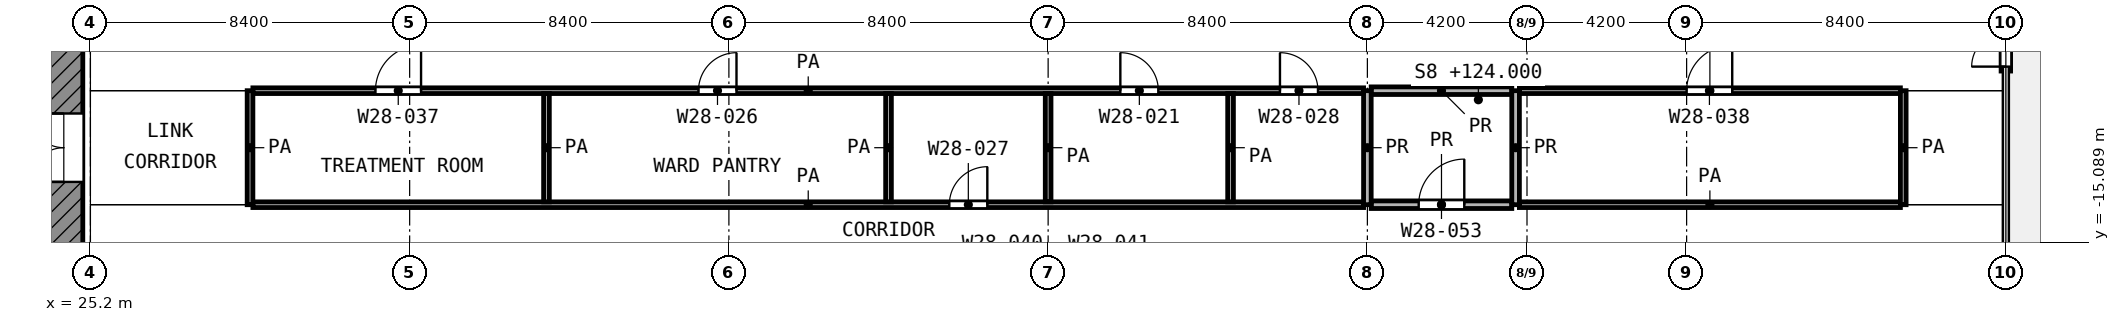
"""IFC4 building model, lengths in metres.
Left out: names, types, materials, properties, quantities, classifications, styles, units other than length and angle.
Written with IfcOpenShell. Run it as: python <this file> out.ifc"""

import sys

from ifc_helpers import new_model, si_unit, direction, frame, frame_2d, origin, place, context, subcontext, project, spatial, rectangle, extrude, element, fill, save


model = new_model("IFC4")
c1 = context("Model", 3, precision=1e-05, world=origin(), true_north=direction((0.0, 1.0)))
c2 = subcontext(c1, "Body", "Model", "MODEL_VIEW")
j1 = project(units=[si_unit("LENGTHUNIT", "METRE"), si_unit("PLANEANGLEUNIT", "RADIAN")], contexts=[c1])
p1 = place(None, origin())
s1 = spatial("IfcSite", under=j1, at=p1, CompositionType="ELEMENT")
p2 = place(p1, origin())
s2 = spatial("IfcBuilding", under=s1, at=p2, CompositionType="ELEMENT")
p3 = place(p2, frame((0.0, 0.0, 124.0)))
s3 = spatial("IfcBuildingStorey", under=s2, at=p3, CompositionType="ELEMENT", Elevation=124.0)
p4 = place(p3, frame((75.6, -10.583, 0.0), z_axis=(0.0, 0.0, 1.0), x_axis=(0.0, 1.0, 0.0)))
e1 = element("IfcWall", 1, at=p4, inside=s3, PredefinedType="SOLIDWALL", context=c2, shape_type="SweptSolid", body=[
    extrude(rectangle(XDim=4.033, YDim=0.25, at=frame_2d((2.017, 0.0))), origin(), (0.0, 0.0, 1.0), 3.48),
])
p5 = place(p4, frame((0.117, 0.0, 0.0)))
e2 = element("IfcOpeningElement", 2, at=p5, cuts=e1, PredefinedType="OPENING", context=c2, shape_type="SweptSolid", body=[
    extrude(rectangle(XDim=1.8, YDim=2.1, at=frame_2d((0.9, 1.05))), frame((0.0, 0.135, 0.0), z_axis=(0.0, -1.0, 0.0), x_axis=(1.0, 0.0, 0.0)), (0.0, 0.0, 1.0), 0.27),
])
p6 = place(p3, frame((24.5, -24.0, 0.0), z_axis=(0.0, 0.0, 1.0), x_axis=(0.0, 1.0, 0.0)))
e3 = element("IfcWall", 3, at=p6, inside=s3, PredefinedType="SHEAR", context=c2, shape_type="SweptSolid", body=[
    extrude(rectangle(XDim=18.6, YDim=1.0, at=frame_2d((9.3, 0.0))), origin(), (0.0, 0.0, 1.0), 3.6),
])
p7 = place(p6, frame((10.5, 0.0, 0.0)))
e4 = element("IfcOpeningElement", 4, at=p7, cuts=e3, PredefinedType="OPENING", context=c2, shape_type="SweptSolid", body=[
    extrude(rectangle(XDim=1.8, YDim=2.1, at=frame_2d((0.9, 1.05))), frame((0.0, 0.51, 0.0), z_axis=(0.0, -1.0, 0.0), x_axis=(1.0, 0.0, 0.0)), (0.0, 0.0, 1.0), 1.02),
])
p8 = place(p3, frame((29.475, -14.1, 0.0), z_axis=(0.0, 0.0, 1.0), x_axis=(1.0, 0.0, 0.0)))
e5 = element("IfcWall", 5, at=p8, inside=s3, PredefinedType="PARTITIONING", context=c2, shape_type="SweptSolid", body=[
    extrude(rectangle(XDim=29.225, YDim=0.15, at=frame_2d((14.612, 0.0))), origin(), (0.0, 0.0, 1.0), 3.6),
])
p9 = place(p8, frame((18.325, 0.0, 0.0)))
e6 = element("IfcOpeningElement", 6, at=p9, cuts=e5, PredefinedType="OPENING", context=c2, shape_type="SweptSolid", body=[
    extrude(rectangle(XDim=1.0, YDim=2.1, at=frame_2d((0.5, 1.05))), frame((0.0, 0.085, 0.0), z_axis=(0.0, -1.0, 0.0), x_axis=(1.0, 0.0, 0.0)), (0.0, 0.0, 1.0), 0.17),
])
p10 = place(p3, frame((62.8, -14.1, 0.0), z_axis=(0.0, 0.0, 1.0), x_axis=(1.0, 0.0, 0.0)))
e7 = element("IfcWall", 7, at=p10, inside=s3, PredefinedType="PARTITIONING", context=c2, shape_type="SweptSolid", body=[
    extrude(rectangle(XDim=10.025, YDim=0.15, at=frame_2d((5.012, 0.0))), origin(), (0.0, 0.0, 1.0), 3.6),
])
p11 = place(p3, frame((29.475, -11.1, 0.0), z_axis=(0.0, 0.0, 1.0), x_axis=(1.0, 0.0, 0.0)))
e8 = element("IfcWall", 8, at=p11, inside=s3, PredefinedType="PARTITIONING", context=c2, shape_type="SweptSolid", body=[
    extrude(rectangle(XDim=29.225, YDim=0.15, at=frame_2d((14.612, 0.0))), origin(), (0.0, 0.0, 1.0), 3.6),
])
p12 = place(p11, frame((3.225, 0.0, 0.0)))
e9 = element("IfcOpeningElement", 9, at=p12, cuts=e8, PredefinedType="OPENING", context=c2, shape_type="SweptSolid", body=[
    extrude(rectangle(XDim=1.2, YDim=2.1, at=frame_2d((0.6, 1.05))), frame((0.0, 0.085, 0.0), z_axis=(0.0, -1.0, 0.0), x_axis=(1.0, 0.0, 0.0)), (0.0, 0.0, 1.0), 0.17),
])
p13 = place(p11, frame((11.725, 0.0, 0.0)))
e10 = element("IfcOpeningElement", 10, at=p13, cuts=e8, PredefinedType="OPENING", context=c2, shape_type="SweptSolid", body=[
    extrude(rectangle(XDim=1.0, YDim=2.1, at=frame_2d((0.5, 1.05))), frame((0.0, 0.085, 0.0), z_axis=(0.0, -1.0, 0.0), x_axis=(1.0, 0.0, 0.0)), (0.0, 0.0, 1.0), 0.17),
])
p14 = place(p11, frame((22.825, 0.0, 0.0)))
e11 = element("IfcOpeningElement", 11, at=p14, cuts=e8, PredefinedType="OPENING", context=c2, shape_type="SweptSolid", body=[
    extrude(rectangle(XDim=1.0, YDim=2.1, at=frame_2d((0.5, 1.05))), frame((0.0, 0.085, 0.0), z_axis=(0.0, -1.0, 0.0), x_axis=(1.0, 0.0, 0.0)), (0.0, 0.0, 1.0), 0.17),
])
p15 = place(p11, frame((27.025, 0.0, 0.0)))
e12 = element("IfcOpeningElement", 12, at=p15, cuts=e8, PredefinedType="OPENING", context=c2, shape_type="SweptSolid", body=[
    extrude(rectangle(XDim=1.0, YDim=2.1, at=frame_2d((0.5, 1.05))), frame((0.0, 0.085, 0.0), z_axis=(0.0, -1.0, 0.0), x_axis=(1.0, 0.0, 0.0)), (0.0, 0.0, 1.0), 0.17),
])
p16 = place(p3, frame((62.8, -11.1, 0.0), z_axis=(0.0, 0.0, 1.0), x_axis=(1.0, 0.0, 0.0)))
e13 = element("IfcWall", 13, at=p16, inside=s3, PredefinedType="PARTITIONING", context=c2, shape_type="SweptSolid", body=[
    extrude(rectangle(XDim=10.025, YDim=0.15, at=frame_2d((5.012, 0.0))), origin(), (0.0, 0.0, 1.0), 3.6),
])
p17 = place(p16, frame((4.4, 0.0, 0.0)))
e14 = element("IfcOpeningElement", 14, at=p17, cuts=e13, PredefinedType="OPENING", context=c2, shape_type="SweptSolid", body=[
    extrude(rectangle(XDim=1.2, YDim=2.1, at=frame_2d((0.6, 1.05))), frame((0.0, 0.085, 0.0), z_axis=(0.0, -1.0, 0.0), x_axis=(1.0, 0.0, 0.0)), (0.0, 0.0, 1.0), 0.17),
])
p18 = place(p3, frame((29.4, -14.1, 0.0), z_axis=(0.0, 0.0, 1.0), x_axis=(0.0, 1.0, 0.0)))
e15 = element("IfcWall", 15, at=p18, inside=s3, PredefinedType="PARTITIONING", context=c2, shape_type="SweptSolid", body=[
    extrude(rectangle(XDim=3.0, YDim=0.15, at=frame_2d((1.5, 0.0))), origin(), (0.0, 0.0, 1.0), 3.6),
])
for number, where, z_axis, x_axis in (
    (16, (37.2, -14.025, 0.0), (0.0, 0.0, 1.0), (0.0, 1.0, 0.0)),
    (17, (46.2, -14.025, 0.0), (0.0, 0.0, 1.0), (0.0, 1.0, 0.0)),
    (18, (50.4, -14.025, 0.0), (0.0, 0.0, 1.0), (0.0, 1.0, 0.0)),
    (19, (55.2, -14.025, 0.0), (0.0, 0.0, 1.0), (0.0, 1.0, 0.0)),
):
    element("IfcWall", number, at=place(p3, frame(where, z_axis=z_axis, x_axis=x_axis)), inside=s3, PredefinedType="PARTITIONING", context=c2, shape_type="SweptSolid", body=[
        extrude(rectangle(XDim=2.85, YDim=0.15, at=frame_2d((1.425, 0.0))), origin(), (0.0, 0.0, 1.0), 3.6),
    ])
p19 = place(p3, frame((72.9, -14.1, 0.0), z_axis=(0.0, 0.0, 1.0), x_axis=(0.0, 1.0, 0.0)))
e20 = element("IfcWall", 20, at=p19, inside=s3, PredefinedType="PARTITIONING", context=c2, shape_type="SweptSolid", body=[
    extrude(rectangle(XDim=3.0, YDim=0.15, at=frame_2d((1.5, 0.0))), origin(), (0.0, 0.0, 1.0), 3.6),
])
p20 = place(p3, frame((58.9, -14.1, 0.0), z_axis=(0.0, 0.0, 1.0), x_axis=(1.0, 0.0, 0.0)))
e21 = element("IfcWall", 21, at=p20, inside=s3, PredefinedType="PARTITIONING", context=c2, shape_type="SweptSolid", body=[
    extrude(rectangle(XDim=3.7, YDim=0.2, at=frame_2d((1.85, 0.0))), origin(), (0.0, 0.0, 1.0), 3.6),
])
p21 = place(p20, frame((1.25, 0.0, 0.0)))
e22 = element("IfcOpeningElement", 22, at=p21, cuts=e21, PredefinedType="OPENING", context=c2, shape_type="SweptSolid", body=[
    extrude(rectangle(XDim=1.2, YDim=2.1, at=frame_2d((0.6, 1.05))), frame((0.0, 0.11, 0.0), z_axis=(0.0, -1.0, 0.0), x_axis=(1.0, 0.0, 0.0)), (0.0, 0.0, 1.0), 0.22),
])
p22 = place(p3, frame((58.9, -11.1, 0.0), z_axis=(0.0, 0.0, 1.0), x_axis=(1.0, 0.0, 0.0)))
e23 = element("IfcWall", 23, at=p22, inside=s3, PredefinedType="PARTITIONING", context=c2, shape_type="SweptSolid", body=[
    extrude(rectangle(XDim=3.7, YDim=0.2, at=frame_2d((1.85, 0.0))), origin(), (0.0, 0.0, 1.0), 3.6),
])
for number, where, z_axis, x_axis in (
    (24, (58.8, -14.1, 0.0), (0.0, 0.0, 1.0), (0.0, 1.0, 0.0)),
    (25, (62.7, -14.1, 0.0), (0.0, 0.0, 1.0), (0.0, 1.0, 0.0)),
):
    element("IfcWall", number, at=place(p3, frame(where, z_axis=z_axis, x_axis=x_axis)), inside=s3, PredefinedType="PARTITIONING", context=c2, shape_type="SweptSolid", body=[
        extrude(rectangle(XDim=3.0, YDim=0.2, at=frame_2d((1.5, 0.0))), origin(), (0.0, 0.0, 1.0), 3.6),
    ])
p23 = place(p5, origin())
e26 = element("IfcDoor", 26, at=p23, inside=s3, OperationType="DOUBLE_DOOR_SINGLE_SWING", PredefinedType="DOOR", context=c2, shape_type="SweptSolid", body=[
    extrude(rectangle(XDim=1.8, YDim=2.1, at=frame_2d((0.9, 1.05))), frame((0.0, 0.025, 0.0), z_axis=(0.0, -1.0, 0.0), x_axis=(1.0, 0.0, 0.0)), (0.0, 0.0, 1.0), 0.05),
])
fill(e2, e26)
p24 = place(p7, origin())
e27 = element("IfcDoor", 27, at=p24, inside=s3, OperationType="DOUBLE_DOOR_SINGLE_SWING", PredefinedType="DOOR", context=c2, shape_type="SweptSolid", body=[
    extrude(rectangle(XDim=1.8, YDim=2.1, at=frame_2d((0.9, 1.05))), frame((0.0, 0.025, 0.0), z_axis=(0.0, -1.0, 0.0), x_axis=(1.0, 0.0, 0.0)), (0.0, 0.0, 1.0), 0.05),
])
fill(e4, e27)
p25 = place(p12, origin())
e28 = element("IfcDoor", 28, at=p25, inside=s3, OperationType="SINGLE_SWING_RIGHT", PredefinedType="DOOR", context=c2, shape_type="SweptSolid", body=[
    extrude(rectangle(XDim=1.2, YDim=2.1, at=frame_2d((0.6, 1.05))), frame((0.0, 0.025, 0.0), z_axis=(0.0, -1.0, 0.0), x_axis=(1.0, 0.0, 0.0)), (0.0, 0.0, 1.0), 0.05),
])
fill(e9, e28)
p26 = place(p13, origin())
e29 = element("IfcDoor", 29, at=p26, inside=s3, OperationType="SINGLE_SWING_RIGHT", PredefinedType="DOOR", context=c2, shape_type="SweptSolid", body=[
    extrude(rectangle(XDim=1.0, YDim=2.1, at=frame_2d((0.5, 1.05))), frame((0.0, 0.025, 0.0), z_axis=(0.0, -1.0, 0.0), x_axis=(1.0, 0.0, 0.0)), (0.0, 0.0, 1.0), 0.05),
])
fill(e10, e29)
p27 = place(p9, origin())
e30 = element("IfcDoor", 30, at=p27, inside=s3, OperationType="SINGLE_SWING_RIGHT", PredefinedType="DOOR", context=c2, shape_type="SweptSolid", body=[
    extrude(rectangle(XDim=1.0, YDim=2.1, at=frame_2d((0.5, 1.05))), frame((0.0, 0.025, 0.0), z_axis=(0.0, -1.0, 0.0), x_axis=(1.0, 0.0, 0.0)), (0.0, 0.0, 1.0), 0.05),
])
fill(e6, e30)
p28 = place(p14, origin())
e31 = element("IfcDoor", 31, at=p28, inside=s3, OperationType="SINGLE_SWING_LEFT", PredefinedType="DOOR", context=c2, shape_type="SweptSolid", body=[
    extrude(rectangle(XDim=1.0, YDim=2.1, at=frame_2d((0.5, 1.05))), frame((0.0, 0.025, 0.0), z_axis=(0.0, -1.0, 0.0), x_axis=(1.0, 0.0, 0.0)), (0.0, 0.0, 1.0), 0.05),
])
fill(e11, e31)
p29 = place(p15, origin())
e32 = element("IfcDoor", 32, at=p29, inside=s3, OperationType="SINGLE_SWING_LEFT", PredefinedType="DOOR", context=c2, shape_type="SweptSolid", body=[
    extrude(rectangle(XDim=1.0, YDim=2.1, at=frame_2d((0.5, 1.05))), frame((0.0, 0.025, 0.0), z_axis=(0.0, -1.0, 0.0), x_axis=(1.0, 0.0, 0.0)), (0.0, 0.0, 1.0), 0.05),
])
fill(e12, e32)
p30 = place(p21, origin())
e33 = element("IfcDoor", 33, at=p30, inside=s3, OperationType="SINGLE_SWING_RIGHT", PredefinedType="DOOR", context=c2, shape_type="SweptSolid", body=[
    extrude(rectangle(XDim=1.2, YDim=2.1, at=frame_2d((0.6, 1.05))), frame((0.0, 0.025, 0.0), z_axis=(0.0, -1.0, 0.0), x_axis=(1.0, 0.0, 0.0)), (0.0, 0.0, 1.0), 0.05),
])
fill(e22, e33)
p31 = place(p17, origin())
e34 = element("IfcDoor", 34, at=p31, inside=s3, OperationType="SINGLE_SWING_RIGHT", PredefinedType="DOOR", context=c2, shape_type="SweptSolid", body=[
    extrude(rectangle(XDim=1.2, YDim=2.1, at=frame_2d((0.6, 1.05))), frame((0.0, 0.025, 0.0), z_axis=(0.0, -1.0, 0.0), x_axis=(1.0, 0.0, 0.0)), (0.0, 0.0, 1.0), 0.05),
])
fill(e14, e34)
save(model, sys.argv[1])
